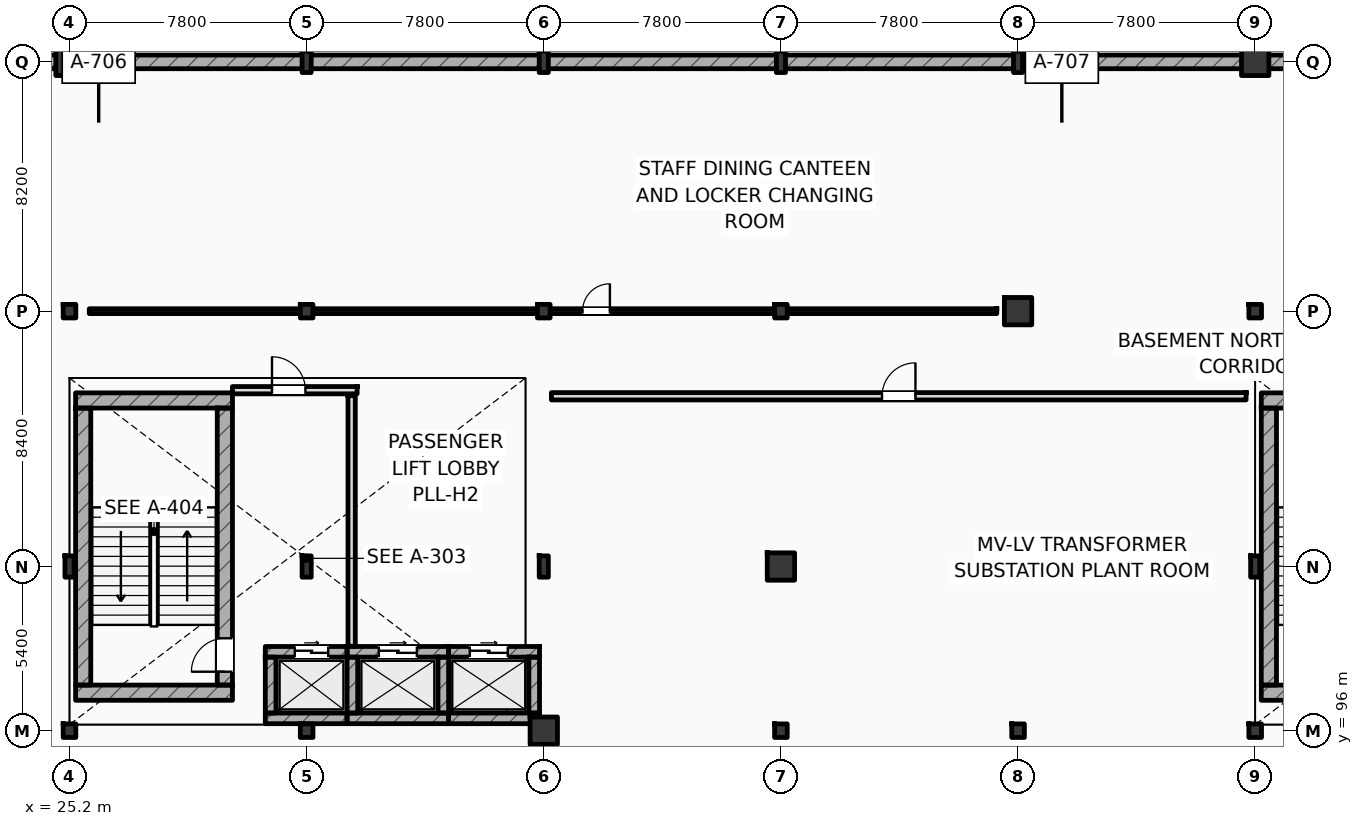
"""IFC4 building model, lengths in metres.
Left out: names, types, materials, properties, quantities, classifications, styles, units other than length and angle.
Written with IfcOpenShell. Run it as: python <this file> out.ifc"""

import sys

from ifc_helpers import new_model, si_unit, direction, frame, frame_2d, origin, origin_2d, place, context, subcontext, project, spatial, rectangle, i_section, extrude, element, fill, save


model = new_model("IFC4")
c1 = context("Model", 3, precision=1e-05, world=origin(), true_north=direction((0.0, 1.0)))
c2 = subcontext(c1, "Body", "Model", "MODEL_VIEW")
j1 = project(units=[si_unit("LENGTHUNIT", "METRE"), si_unit("PLANEANGLEUNIT", "RADIAN")], contexts=[c1])
p1 = place(None, origin())
s1 = spatial("IfcSite", under=j1, at=p1, CompositionType="ELEMENT")
p2 = place(p1, origin())
s2 = spatial("IfcBuilding", under=s1, at=p2, CompositionType="ELEMENT")
p3 = place(p2, frame((0.0, 0.0, -4.5)))
s3 = spatial("IfcBuildingStorey", under=s2, at=p3, CompositionType="ELEMENT", Elevation=-4.5)
p4 = place(p3, frame((120.0, 118.0, 0.0), z_axis=(0.0, 0.0, 1.0), x_axis=(-1.0, 0.0, 0.0)))
e1 = element("IfcWall", 1, at=p4, inside=s3, PredefinedType="SOLIDWALL", context=c2, shape_type="SweptSolid", body=[
    extrude(rectangle(XDim=97.5, YDim=0.45, at=frame_2d((48.75, 0.0))), origin(), (0.0, 0.0, 1.0), 4.5),
])
p5 = place(p3, frame((25.2, 96.0, 0.0), z_axis=(0.0, 0.0, 1.0), x_axis=(1.0, 0.0, 0.0)))
e2 = element("IfcColumn", 2, at=p5, inside=s3, PredefinedType="COLUMN", context=c2, shape_type="SweptSolid", body=[
    extrude(i_section(OverallWidth=0.416, OverallDepth=0.446, WebThickness=0.036, FlangeThickness=0.048, FilletRadius=0.015, at=origin_2d()), origin(), (0.0, 0.0, 1.0), 4.5),
])
p6 = place(p3, frame((25.2, 101.4, 0.0), z_axis=(0.0, 0.0, 1.0), x_axis=(1.0, 0.0, 0.0)))
e3 = element("IfcColumn", 3, at=p6, inside=s3, PredefinedType="COLUMN", context=c2, shape_type="SweptSolid", body=[
    extrude(i_section(OverallWidth=0.3, OverallDepth=0.7, WebThickness=0.017, FlangeThickness=0.032, FilletRadius=0.027, at=origin_2d()), origin(), (0.0, 0.0, 1.0), 4.5),
])
p7 = place(p3, frame((25.2, 109.8, 0.0), z_axis=(0.0, 0.0, 1.0), x_axis=(1.0, 0.0, 0.0)))
e4 = element("IfcColumn", 4, at=p7, inside=s3, PredefinedType="COLUMN", context=c2, shape_type="SweptSolid", body=[
    extrude(i_section(OverallWidth=0.416, OverallDepth=0.446, WebThickness=0.036, FlangeThickness=0.048, FilletRadius=0.015, at=origin_2d()), origin(), (0.0, 0.0, 1.0), 4.5),
])
p8 = place(p3, frame((25.2, 118.0, 0.0), z_axis=(0.0, 0.0, 1.0), x_axis=(1.0, 0.0, 0.0)))
e5 = element("IfcColumn", 5, at=p8, inside=s3, PredefinedType="COLUMN", context=c2, shape_type="SweptSolid", body=[
    extrude(rectangle(XDim=0.9, YDim=0.9, at=origin_2d()), origin(), (0.0, 0.0, 1.0), 4.5),
])
p9 = place(p3, frame((33.0, 96.0, 0.0), z_axis=(0.0, 0.0, 1.0), x_axis=(1.0, 0.0, 0.0)))
e6 = element("IfcColumn", 6, at=p9, inside=s3, PredefinedType="COLUMN", context=c2, shape_type="SweptSolid", body=[
    extrude(i_section(OverallWidth=0.416, OverallDepth=0.446, WebThickness=0.036, FlangeThickness=0.048, FilletRadius=0.015, at=origin_2d()), origin(), (0.0, 0.0, 1.0), 4.5),
])
p10 = place(p3, frame((33.0, 101.4, 0.0), z_axis=(0.0, 0.0, 1.0), x_axis=(1.0, 0.0, 0.0)))
e7 = element("IfcColumn", 7, at=p10, inside=s3, PredefinedType="COLUMN", context=c2, shape_type="SweptSolid", body=[
    extrude(i_section(OverallWidth=0.3, OverallDepth=0.7, WebThickness=0.017, FlangeThickness=0.032, FilletRadius=0.027, at=origin_2d()), origin(), (0.0, 0.0, 1.0), 4.5),
])
p11 = place(p3, frame((33.0, 109.8, 0.0), z_axis=(0.0, 0.0, 1.0), x_axis=(1.0, 0.0, 0.0)))
e8 = element("IfcColumn", 8, at=p11, inside=s3, PredefinedType="COLUMN", context=c2, shape_type="SweptSolid", body=[
    extrude(i_section(OverallWidth=0.416, OverallDepth=0.446, WebThickness=0.036, FlangeThickness=0.048, FilletRadius=0.015, at=origin_2d()), origin(), (0.0, 0.0, 1.0), 4.5),
])
p12 = place(p3, frame((33.0, 118.0, 0.0), z_axis=(0.0, 0.0, 1.0), x_axis=(1.0, 0.0, 0.0)))
e9 = element("IfcColumn", 9, at=p12, inside=s3, PredefinedType="COLUMN", context=c2, shape_type="SweptSolid", body=[
    extrude(i_section(OverallWidth=0.3, OverallDepth=0.7, WebThickness=0.017, FlangeThickness=0.032, FilletRadius=0.027, at=origin_2d()), origin(), (0.0, 0.0, 1.0), 4.5),
])
p13 = place(p3, frame((40.8, 96.0, 0.0), z_axis=(0.0, 0.0, 1.0), x_axis=(1.0, 0.0, 0.0)))
e10 = element("IfcColumn", 10, at=p13, inside=s3, PredefinedType="COLUMN", context=c2, shape_type="SweptSolid", body=[
    extrude(rectangle(XDim=0.9, YDim=0.9, at=origin_2d()), origin(), (0.0, 0.0, 1.0), 4.5),
])
p14 = place(p3, frame((40.8, 101.4, 0.0), z_axis=(0.0, 0.0, 1.0), x_axis=(1.0, 0.0, 0.0)))
e11 = element("IfcColumn", 11, at=p14, inside=s3, PredefinedType="COLUMN", context=c2, shape_type="SweptSolid", body=[
    extrude(i_section(OverallWidth=0.3, OverallDepth=0.7, WebThickness=0.017, FlangeThickness=0.032, FilletRadius=0.027, at=origin_2d()), origin(), (0.0, 0.0, 1.0), 4.5),
])
p15 = place(p3, frame((40.8, 109.8, 0.0), z_axis=(0.0, 0.0, 1.0), x_axis=(1.0, 0.0, 0.0)))
e12 = element("IfcColumn", 12, at=p15, inside=s3, PredefinedType="COLUMN", context=c2, shape_type="SweptSolid", body=[
    extrude(i_section(OverallWidth=0.416, OverallDepth=0.446, WebThickness=0.036, FlangeThickness=0.048, FilletRadius=0.015, at=origin_2d()), origin(), (0.0, 0.0, 1.0), 4.5),
])
p16 = place(p3, frame((40.8, 118.0, 0.0), z_axis=(0.0, 0.0, 1.0), x_axis=(1.0, 0.0, 0.0)))
e13 = element("IfcColumn", 13, at=p16, inside=s3, PredefinedType="COLUMN", context=c2, shape_type="SweptSolid", body=[
    extrude(i_section(OverallWidth=0.3, OverallDepth=0.7, WebThickness=0.017, FlangeThickness=0.032, FilletRadius=0.027, at=origin_2d()), origin(), (0.0, 0.0, 1.0), 4.5),
])
p17 = place(p3, frame((48.6, 96.0, 0.0), z_axis=(0.0, 0.0, 1.0), x_axis=(1.0, 0.0, 0.0)))
e14 = element("IfcColumn", 14, at=p17, inside=s3, PredefinedType="COLUMN", context=c2, shape_type="SweptSolid", body=[
    extrude(i_section(OverallWidth=0.416, OverallDepth=0.446, WebThickness=0.036, FlangeThickness=0.048, FilletRadius=0.015, at=origin_2d()), origin(), (0.0, 0.0, 1.0), 4.5),
])
p18 = place(p3, frame((48.6, 101.4, 0.0), z_axis=(0.0, 0.0, 1.0), x_axis=(1.0, 0.0, 0.0)))
e15 = element("IfcColumn", 15, at=p18, inside=s3, PredefinedType="COLUMN", context=c2, shape_type="SweptSolid", body=[
    extrude(rectangle(XDim=0.9, YDim=0.9, at=origin_2d()), origin(), (0.0, 0.0, 1.0), 4.5),
])
p19 = place(p3, frame((48.6, 109.8, 0.0), z_axis=(0.0, 0.0, 1.0), x_axis=(1.0, 0.0, 0.0)))
e16 = element("IfcColumn", 16, at=p19, inside=s3, PredefinedType="COLUMN", context=c2, shape_type="SweptSolid", body=[
    extrude(i_section(OverallWidth=0.416, OverallDepth=0.446, WebThickness=0.036, FlangeThickness=0.048, FilletRadius=0.015, at=origin_2d()), origin(), (0.0, 0.0, 1.0), 4.5),
])
p20 = place(p3, frame((48.6, 118.0, 0.0), z_axis=(0.0, 0.0, 1.0), x_axis=(1.0, 0.0, 0.0)))
e17 = element("IfcColumn", 17, at=p20, inside=s3, PredefinedType="COLUMN", context=c2, shape_type="SweptSolid", body=[
    extrude(i_section(OverallWidth=0.3, OverallDepth=0.7, WebThickness=0.017, FlangeThickness=0.032, FilletRadius=0.027, at=origin_2d()), origin(), (0.0, 0.0, 1.0), 4.5),
])
p21 = place(p3, frame((56.4, 96.0, 0.0), z_axis=(0.0, 0.0, 1.0), x_axis=(1.0, 0.0, 0.0)))
e18 = element("IfcColumn", 18, at=p21, inside=s3, PredefinedType="COLUMN", context=c2, shape_type="SweptSolid", body=[
    extrude(i_section(OverallWidth=0.416, OverallDepth=0.446, WebThickness=0.036, FlangeThickness=0.048, FilletRadius=0.015, at=origin_2d()), origin(), (0.0, 0.0, 1.0), 4.5),
])
p22 = place(p3, frame((56.4, 101.4, 0.0), z_axis=(0.0, 0.0, 1.0), x_axis=(1.0, 0.0, 0.0)))
e19 = element("IfcColumn", 19, at=p22, inside=s3, PredefinedType="COLUMN", context=c2, shape_type="SweptSolid", body=[
    extrude(i_section(OverallWidth=0.3, OverallDepth=0.7, WebThickness=0.017, FlangeThickness=0.032, FilletRadius=0.027, at=origin_2d()), origin(), (0.0, 0.0, 1.0), 4.5),
])
p23 = place(p3, frame((56.4, 109.8, 0.0), z_axis=(0.0, 0.0, 1.0), x_axis=(1.0, 0.0, 0.0)))
e20 = element("IfcColumn", 20, at=p23, inside=s3, PredefinedType="COLUMN", context=c2, shape_type="SweptSolid", body=[
    extrude(rectangle(XDim=0.9, YDim=0.9, at=origin_2d()), origin(), (0.0, 0.0, 1.0), 4.5),
])
p24 = place(p3, frame((56.4, 118.0, 0.0), z_axis=(0.0, 0.0, 1.0), x_axis=(1.0, 0.0, 0.0)))
e21 = element("IfcColumn", 21, at=p24, inside=s3, PredefinedType="COLUMN", context=c2, shape_type="SweptSolid", body=[
    extrude(i_section(OverallWidth=0.3, OverallDepth=0.7, WebThickness=0.017, FlangeThickness=0.032, FilletRadius=0.027, at=origin_2d()), origin(), (0.0, 0.0, 1.0), 4.5),
])
p25 = place(p3, frame((64.2, 96.0, 0.0), z_axis=(0.0, 0.0, 1.0), x_axis=(1.0, 0.0, 0.0)))
e22 = element("IfcColumn", 22, at=p25, inside=s3, PredefinedType="COLUMN", context=c2, shape_type="SweptSolid", body=[
    extrude(i_section(OverallWidth=0.416, OverallDepth=0.446, WebThickness=0.036, FlangeThickness=0.048, FilletRadius=0.015, at=origin_2d()), origin(), (0.0, 0.0, 1.0), 4.5),
])
p26 = place(p3, frame((64.2, 101.4, 0.0), z_axis=(0.0, 0.0, 1.0), x_axis=(1.0, 0.0, 0.0)))
e23 = element("IfcColumn", 23, at=p26, inside=s3, PredefinedType="COLUMN", context=c2, shape_type="SweptSolid", body=[
    extrude(i_section(OverallWidth=0.3, OverallDepth=0.7, WebThickness=0.017, FlangeThickness=0.032, FilletRadius=0.027, at=origin_2d()), origin(), (0.0, 0.0, 1.0), 4.5),
])
p27 = place(p3, frame((64.2, 109.8, 0.0), z_axis=(0.0, 0.0, 1.0), x_axis=(1.0, 0.0, 0.0)))
e24 = element("IfcColumn", 24, at=p27, inside=s3, PredefinedType="COLUMN", context=c2, shape_type="SweptSolid", body=[
    extrude(i_section(OverallWidth=0.416, OverallDepth=0.446, WebThickness=0.036, FlangeThickness=0.048, FilletRadius=0.015, at=origin_2d()), origin(), (0.0, 0.0, 1.0), 4.5),
])
p28 = place(p3, frame((64.2, 118.0, 0.0), z_axis=(0.0, 0.0, 1.0), x_axis=(1.0, 0.0, 0.0)))
e25 = element("IfcColumn", 25, at=p28, inside=s3, PredefinedType="COLUMN", context=c2, shape_type="SweptSolid", body=[
    extrude(rectangle(XDim=0.9, YDim=0.9, at=origin_2d()), origin(), (0.0, 0.0, 1.0), 4.5),
])
for number, where, z_axis, x_axis in (
    (26, (25.4, 106.862, 0.0), (0.0, 0.0, 1.0), (1.0, 0.0, 0.0)),
    (27, (25.4, 97.25, 0.0), (0.0, 0.0, 1.0), (1.0, 0.0, 0.0)),
):
    element("IfcWall", number, at=place(p3, frame(where, z_axis=z_axis, x_axis=x_axis)), inside=s3, PredefinedType="SHEAR", context=c2, shape_type="SweptSolid", body=[
        extrude(rectangle(XDim=5.16, YDim=0.5, at=frame_2d((2.58, 0.0))), origin(), (0.0, 0.0, 1.0), 4.5),
    ])
p29 = place(p3, frame((25.65, 97.5, 0.0), z_axis=(0.0, 0.0, 1.0), x_axis=(0.0, 1.0, 0.0)))
e28 = element("IfcWall", 28, at=p29, inside=s3, PredefinedType="SHEAR", context=c2, shape_type="SweptSolid", body=[
    extrude(rectangle(XDim=9.112, YDim=0.5, at=frame_2d((4.556, 0.0))), origin(), (0.0, 0.0, 1.0), 4.5),
])
p30 = place(p3, frame((30.31, 97.5, 0.0), z_axis=(0.0, 0.0, 1.0), x_axis=(0.0, 1.0, 0.0)))
e29 = element("IfcWall", 29, at=p30, inside=s3, PredefinedType="SHEAR", context=c2, shape_type="SweptSolid", body=[
    extrude(rectangle(XDim=9.112, YDim=0.5, at=frame_2d((4.556, 0.0))), origin(), (0.0, 0.0, 1.0), 4.5),
])
p31 = place(p30, frame((0.44, 0.0, 0.0)))
e30 = element("IfcOpeningElement", 30, at=p31, cuts=e29, PredefinedType="OPENING", context=c2, shape_type="SweptSolid", body=[
    extrude(rectangle(XDim=1.1, YDim=2.2, at=frame_2d((0.55, 1.1))), frame((0.0, 0.26, 0.0), z_axis=(0.0, -1.0, 0.0), x_axis=(1.0, 0.0, 0.0)), (0.0, 0.0, 1.0), 0.52),
])
for number, where, z_axis, x_axis in (
    (31, (64.4, 106.862, 0.0), (0.0, 0.0, 1.0), (1.0, 0.0, 0.0)),
    (32, (64.4, 97.25, 0.0), (0.0, 0.0, 1.0), (1.0, 0.0, 0.0)),
):
    element("IfcWall", number, at=place(p3, frame(where, z_axis=z_axis, x_axis=x_axis)), inside=s3, PredefinedType="SHEAR", context=c2, shape_type="SweptSolid", body=[
        extrude(rectangle(XDim=5.16, YDim=0.5, at=frame_2d((2.58, 0.0))), origin(), (0.0, 0.0, 1.0), 4.5),
    ])
p32 = place(p3, frame((64.65, 97.5, 0.0), z_axis=(0.0, 0.0, 1.0), x_axis=(0.0, 1.0, 0.0)))
e33 = element("IfcWall", 33, at=p32, inside=s3, PredefinedType="SHEAR", context=c2, shape_type="SweptSolid", body=[
    extrude(rectangle(XDim=9.112, YDim=0.5, at=frame_2d((4.556, 0.0))), origin(), (0.0, 0.0, 1.0), 4.5),
])
p33 = place(p3, frame((31.64, 98.595, 0.0), z_axis=(0.0, 0.0, 1.0), x_axis=(1.0, 0.0, 0.0)))
e34 = element("IfcWall", 34, at=p33, inside=s3, PredefinedType="SHEAR", context=c2, shape_type="SweptSolid", body=[
    extrude(rectangle(XDim=2.69, YDim=0.35, at=frame_2d((1.345, 0.0))), origin(), (0.0, 0.0, 1.0), 4.1),
])
p34 = place(p33, frame((0.97, 0.0, 0.0)))
e35 = element("IfcOpeningElement", 35, at=p34, cuts=e34, PredefinedType="OPENING", context=c2, shape_type="SweptSolid", body=[
    extrude(rectangle(XDim=1.1, YDim=2.2, at=frame_2d((0.55, 1.1))), frame((0.0, 0.185, 0.0), z_axis=(0.0, -1.0, 0.0), x_axis=(1.0, 0.0, 0.0)), (0.0, 0.0, 1.0), 0.37),
])
p35 = place(p3, frame((31.64, 96.405, 0.0), z_axis=(0.0, 0.0, 1.0), x_axis=(1.0, 0.0, 0.0)))
e36 = element("IfcWall", 36, at=p35, inside=s3, PredefinedType="SHEAR", context=c2, shape_type="SweptSolid", body=[
    extrude(rectangle(XDim=2.69, YDim=0.35, at=frame_2d((1.345, 0.0))), origin(), (0.0, 0.0, 1.0), 4.1),
])
p36 = place(p3, frame((31.815, 96.58, 0.0), z_axis=(0.0, 0.0, 1.0), x_axis=(0.0, 1.0, 0.0)))
e37 = element("IfcWall", 37, at=p36, inside=s3, PredefinedType="SHEAR", context=c2, shape_type="SweptSolid", body=[
    extrude(rectangle(XDim=1.84, YDim=0.35, at=frame_2d((0.92, 0.0))), origin(), (0.0, 0.0, 1.0), 4.1),
])
p37 = place(p3, frame((34.33, 98.595, 0.0), z_axis=(0.0, 0.0, 1.0), x_axis=(1.0, 0.0, 0.0)))
e38 = element("IfcWall", 38, at=p37, inside=s3, PredefinedType="SHEAR", context=c2, shape_type="SweptSolid", body=[
    extrude(rectangle(XDim=3.34, YDim=0.35, at=frame_2d((1.67, 0.0))), origin(), (0.0, 0.0, 1.0), 4.1),
])
p38 = place(p37, frame((1.045, 0.0, 0.0)))
e39 = element("IfcOpeningElement", 39, at=p38, cuts=e38, PredefinedType="OPENING", context=c2, shape_type="SweptSolid", body=[
    extrude(rectangle(XDim=1.25, YDim=2.25, at=frame_2d((0.625, 1.125))), frame((0.0, 0.185, 0.0), z_axis=(0.0, -1.0, 0.0), x_axis=(1.0, 0.0, 0.0)), (0.0, 0.0, 1.0), 0.37),
])
p39 = place(p3, frame((34.33, 96.405, 0.0), z_axis=(0.0, 0.0, 1.0), x_axis=(1.0, 0.0, 0.0)))
e40 = element("IfcWall", 40, at=p39, inside=s3, PredefinedType="SHEAR", context=c2, shape_type="SweptSolid", body=[
    extrude(rectangle(XDim=3.34, YDim=0.35, at=frame_2d((1.67, 0.0))), origin(), (0.0, 0.0, 1.0), 4.1),
])
for number, where, z_axis, x_axis in (
    (41, (34.505, 96.58, 0.0), (0.0, 0.0, 1.0), (0.0, 1.0, 0.0)),
    (42, (37.495, 96.58, 0.0), (0.0, 0.0, 1.0), (0.0, 1.0, 0.0)),
):
    element("IfcWall", number, at=place(p3, frame(where, z_axis=z_axis, x_axis=x_axis)), inside=s3, PredefinedType="SHEAR", context=c2, shape_type="SweptSolid", body=[
        extrude(rectangle(XDim=1.84, YDim=0.35, at=frame_2d((0.92, 0.0))), origin(), (0.0, 0.0, 1.0), 4.1),
    ])
p40 = place(p3, frame((37.67, 98.595, 0.0), z_axis=(0.0, 0.0, 1.0), x_axis=(1.0, 0.0, 0.0)))
e43 = element("IfcWall", 43, at=p40, inside=s3, PredefinedType="SHEAR", context=c2, shape_type="SweptSolid", body=[
    extrude(rectangle(XDim=2.99, YDim=0.35, at=frame_2d((1.495, 0.0))), origin(), (0.0, 0.0, 1.0), 4.1),
])
p41 = place(p40, frame((0.695, 0.0, 0.0)))
e44 = element("IfcOpeningElement", 44, at=p41, cuts=e43, PredefinedType="OPENING", context=c2, shape_type="SweptSolid", body=[
    extrude(rectangle(XDim=1.25, YDim=2.25, at=frame_2d((0.625, 1.125))), frame((0.0, 0.185, 0.0), z_axis=(0.0, -1.0, 0.0), x_axis=(1.0, 0.0, 0.0)), (0.0, 0.0, 1.0), 0.37),
])
p42 = place(p3, frame((37.67, 96.405, 0.0), z_axis=(0.0, 0.0, 1.0), x_axis=(1.0, 0.0, 0.0)))
e45 = element("IfcWall", 45, at=p42, inside=s3, PredefinedType="SHEAR", context=c2, shape_type="SweptSolid", body=[
    extrude(rectangle(XDim=2.99, YDim=0.35, at=frame_2d((1.495, 0.0))), origin(), (0.0, 0.0, 1.0), 4.1),
])
p43 = place(p3, frame((40.485, 96.58, 0.0), z_axis=(0.0, 0.0, 1.0), x_axis=(0.0, 1.0, 0.0)))
e46 = element("IfcWall", 46, at=p43, inside=s3, PredefinedType="SHEAR", context=c2, shape_type="SweptSolid", body=[
    extrude(rectangle(XDim=1.84, YDim=0.35, at=frame_2d((0.92, 0.0))), origin(), (0.0, 0.0, 1.0), 3.64),
])
p44 = place(p3, frame((34.48, 98.78, 0.0), z_axis=(0.0, 0.0, 1.0), x_axis=(0.0, 1.0, 0.0)))
e47 = element("IfcWall", 47, at=p44, inside=s3, PredefinedType="STANDARD", context=c2, shape_type="SweptSolid", body=[
    extrude(rectangle(XDim=8.24, YDim=0.24, at=frame_2d((4.12, 0.0))), origin(), (0.0, 0.0, 1.0), 4.1),
])
p45 = place(p3, frame((30.56, 107.2, 0.0), z_axis=(0.0, 0.0, 1.0), x_axis=(1.0, 0.0, 0.0)))
e48 = element("IfcWall", 48, at=p45, inside=s3, PredefinedType="STANDARD", context=c2, shape_type="SweptSolid", body=[
    extrude(rectangle(XDim=4.1, YDim=0.24, at=frame_2d((2.05, 0.0))), origin(), (0.0, 0.0, 1.0), 4.1),
])
p46 = place(p45, frame((1.3, 0.0, 0.0)))
e49 = element("IfcOpeningElement", 49, at=p46, cuts=e48, PredefinedType="OPENING", context=c2, shape_type="SweptSolid", body=[
    extrude(rectangle(XDim=1.1, YDim=2.2, at=frame_2d((0.55, 1.1))), frame((0.0, 0.13, 0.0), z_axis=(0.0, -1.0, 0.0), x_axis=(1.0, 0.0, 0.0)), (0.0, 0.0, 1.0), 0.26),
])
p47 = place(p3, frame((25.85, 109.8, 0.0), z_axis=(0.0, 0.0, 1.0), x_axis=(1.0, 0.0, 0.0)))
e50 = element("IfcWall", 50, at=p47, inside=s3, PredefinedType="PARTITIONING", context=c2, shape_type="SweptSolid", body=[
    extrude(rectangle(XDim=29.85, YDim=0.16, at=frame_2d((14.925, 0.0))), origin(), (0.0, 0.0, 1.0), 3.59),
])
p48 = place(p47, frame((16.225, 0.0, 0.0)))
e51 = element("IfcOpeningElement", 51, at=p48, cuts=e50, PredefinedType="OPENING", context=c2, shape_type="SweptSolid", body=[
    extrude(rectangle(XDim=0.9, YDim=2.1, at=frame_2d((0.45, 1.05))), frame((0.0, 0.09, 0.0), z_axis=(0.0, -1.0, 0.0), x_axis=(1.0, 0.0, 0.0)), (0.0, 0.0, 1.0), 0.18),
])
p49 = place(p3, frame((41.05, 107.0, 0.0), z_axis=(0.0, 0.0, 1.0), x_axis=(1.0, 0.0, 0.0)))
e52 = element("IfcWall", 52, at=p49, inside=s3, PredefinedType="STANDARD", context=c2, shape_type="SweptSolid", body=[
    extrude(rectangle(XDim=22.85, YDim=0.24, at=frame_2d((11.425, 0.0))), origin(), (0.0, 0.0, 1.0), 4.1),
])
p50 = place(p49, frame((10.875, 0.0, 0.0)))
e53 = element("IfcOpeningElement", 53, at=p50, cuts=e52, PredefinedType="OPENING", context=c2, shape_type="SweptSolid", body=[
    extrude(rectangle(XDim=1.1, YDim=2.2, at=frame_2d((0.55, 1.1))), frame((0.0, 0.13, 0.0), z_axis=(0.0, -1.0, 0.0), x_axis=(1.0, 0.0, 0.0)), (0.0, 0.0, 1.0), 0.26),
])
p51 = place(p31, origin())
e54 = element("IfcDoor", 54, at=p51, inside=s3, OperationType="SINGLE_SWING_LEFT", PredefinedType="DOOR", context=c2, shape_type="SweptSolid", body=[
    extrude(rectangle(XDim=1.1, YDim=2.2, at=frame_2d((0.55, 1.1))), frame((0.0, 0.025, 0.0), z_axis=(0.0, -1.0, 0.0), x_axis=(1.0, 0.0, 0.0)), (0.0, 0.0, 1.0), 0.05),
])
fill(e30, e54)
p52 = place(p34, origin())
e55 = element("IfcDoor", 55, at=p52, inside=s3, OperationType="SLIDING_TO_LEFT", PredefinedType="DOOR", context=c2, shape_type="SweptSolid", body=[
    extrude(rectangle(XDim=1.1, YDim=2.2, at=frame_2d((0.55, 1.1))), frame((0.0, 0.025, 0.0), z_axis=(0.0, -1.0, 0.0), x_axis=(1.0, 0.0, 0.0)), (0.0, 0.0, 1.0), 0.05),
])
fill(e35, e55)
p53 = place(p38, origin())
e56 = element("IfcDoor", 56, at=p53, inside=s3, OperationType="SLIDING_TO_LEFT", PredefinedType="DOOR", context=c2, shape_type="SweptSolid", body=[
    extrude(rectangle(XDim=1.25, YDim=2.25, at=frame_2d((0.625, 1.125))), frame((0.0, 0.025, 0.0), z_axis=(0.0, -1.0, 0.0), x_axis=(1.0, 0.0, 0.0)), (0.0, 0.0, 1.0), 0.05),
])
fill(e39, e56)
p54 = place(p41, origin())
e57 = element("IfcDoor", 57, at=p54, inside=s3, OperationType="SLIDING_TO_LEFT", PredefinedType="DOOR", context=c2, shape_type="SweptSolid", body=[
    extrude(rectangle(XDim=1.25, YDim=2.25, at=frame_2d((0.625, 1.125))), frame((0.0, 0.025, 0.0), z_axis=(0.0, -1.0, 0.0), x_axis=(1.0, 0.0, 0.0)), (0.0, 0.0, 1.0), 0.05),
])
fill(e44, e57)
p55 = place(p46, origin())
e58 = element("IfcDoor", 58, at=p55, inside=s3, OperationType="SINGLE_SWING_LEFT", PredefinedType="DOOR", context=c2, shape_type="SweptSolid", body=[
    extrude(rectangle(XDim=1.1, YDim=2.2, at=frame_2d((0.55, 1.1))), frame((0.0, 0.025, 0.0), z_axis=(0.0, -1.0, 0.0), x_axis=(1.0, 0.0, 0.0)), (0.0, 0.0, 1.0), 0.05),
])
fill(e49, e58)
p56 = place(p48, origin())
e59 = element("IfcDoor", 59, at=p56, inside=s3, OperationType="SINGLE_SWING_RIGHT", PredefinedType="DOOR", context=c2, shape_type="SweptSolid", body=[
    extrude(rectangle(XDim=0.9, YDim=2.1, at=frame_2d((0.45, 1.05))), frame((0.0, 0.025, 0.0), z_axis=(0.0, -1.0, 0.0), x_axis=(1.0, 0.0, 0.0)), (0.0, 0.0, 1.0), 0.05),
])
fill(e51, e59)
p57 = place(p50, origin())
e60 = element("IfcDoor", 60, at=p57, inside=s3, OperationType="SINGLE_SWING_RIGHT", PredefinedType="DOOR", context=c2, shape_type="SweptSolid", body=[
    extrude(rectangle(XDim=1.1, YDim=2.2, at=frame_2d((0.55, 1.1))), frame((0.0, 0.025, 0.0), z_axis=(0.0, -1.0, 0.0), x_axis=(1.0, 0.0, 0.0)), (0.0, 0.0, 1.0), 0.05),
])
fill(e53, e60)
save(model, sys.argv[1])
